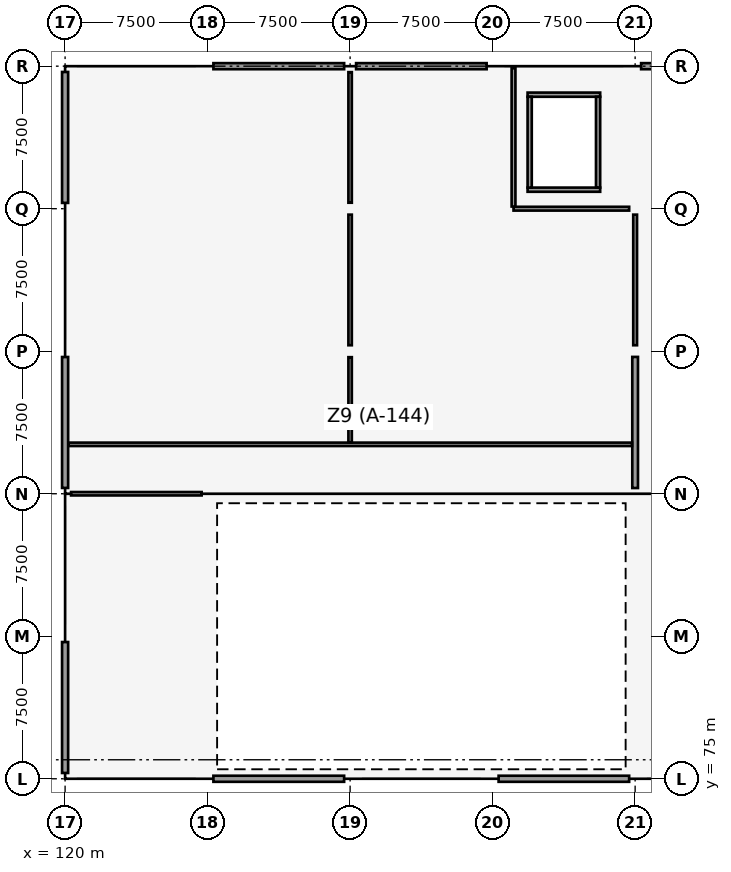
"""IFC4 building model, lengths in metres.
Left out: names, types, materials, properties, quantities, classifications, styles, units other than length and angle.
Written with IfcOpenShell. Run it as: python <this file> out.ifc"""

import sys

from ifc_helpers import new_model, si_unit, direction, frame, frame_2d, origin, origin_2d, place, context, subcontext, project, spatial, rectangle, extrude, element, fill, save


model = new_model("IFC4")
c1 = context("Model", 3, precision=1e-05, world=origin(), true_north=direction((0.0, 1.0)))
c2 = subcontext(c1, "Body", "Model", "MODEL_VIEW")
j1 = project(units=[si_unit("LENGTHUNIT", "METRE"), si_unit("PLANEANGLEUNIT", "RADIAN")], contexts=[c1])
p1 = place(None, origin())
s1 = spatial("IfcSite", under=j1, at=p1, CompositionType="ELEMENT")
p2 = place(p1, origin())
s2 = spatial("IfcBuilding", under=s1, at=p2, CompositionType="ELEMENT")
p3 = place(p2, frame((0.0, 0.0, 9.0)))
s3 = spatial("IfcBuildingStorey", under=s2, at=p3, CompositionType="ELEMENT", Elevation=9.0)
for number, where, z_axis, x_axis in (
    (1, (120.0, 75.0, 0.0), (0.0, 0.0, 1.0), (1.0, 0.0, 0.0)),
    (2, (120.0, 82.5, 0.0), (0.0, 0.0, 1.0), (1.0, 0.0, 0.0)),
    (3, (120.0, 90.0, 0.0), (0.0, 0.0, 1.0), (1.0, 0.0, 0.0)),
    (4, (120.0, 97.5, 0.0), (0.0, 0.0, 1.0), (1.0, 0.0, 0.0)),
    (5, (120.0, 105.0, 0.0), (0.0, 0.0, 1.0), (1.0, 0.0, 0.0)),
    (6, (120.0, 112.5, 0.0), (0.0, 0.0, 1.0), (1.0, 0.0, 0.0)),
    (7, (127.5, 75.0, 0.0), (0.0, 0.0, 1.0), (1.0, 0.0, 0.0)),
    (8, (127.5, 82.5, 0.0), (0.0, 0.0, 1.0), (1.0, 0.0, 0.0)),
    (9, (127.5, 90.0, 0.0), (0.0, 0.0, 1.0), (1.0, 0.0, 0.0)),
    (10, (127.5, 97.5, 0.0), (0.0, 0.0, 1.0), (1.0, 0.0, 0.0)),
    (11, (127.5, 105.0, 0.0), (0.0, 0.0, 1.0), (1.0, 0.0, 0.0)),
    (12, (127.5, 112.5, 0.0), (0.0, 0.0, 1.0), (1.0, 0.0, 0.0)),
    (13, (135.0, 75.0, 0.0), (0.0, 0.0, 1.0), (1.0, 0.0, 0.0)),
    (14, (135.0, 90.0, 0.0), (0.0, 0.0, 1.0), (1.0, 0.0, 0.0)),
    (15, (135.0, 97.5, 0.0), (0.0, 0.0, 1.0), (1.0, 0.0, 0.0)),
    (16, (135.0, 105.0, 0.0), (0.0, 0.0, 1.0), (1.0, 0.0, 0.0)),
    (17, (135.0, 112.5, 0.0), (0.0, 0.0, 1.0), (1.0, 0.0, 0.0)),
    (18, (142.5, 75.0, 0.0), (0.0, 0.0, 1.0), (1.0, 0.0, 0.0)),
    (19, (142.5, 90.0, 0.0), (0.0, 0.0, 1.0), (1.0, 0.0, 0.0)),
    (20, (142.5, 97.5, 0.0), (0.0, 0.0, 1.0), (1.0, 0.0, 0.0)),
    (21, (142.5, 105.0, 0.0), (0.0, 0.0, 1.0), (1.0, 0.0, 0.0)),
    (22, (142.5, 112.5, 0.0), (0.0, 0.0, 1.0), (1.0, 0.0, 0.0)),
    (23, (150.0, 75.0, 0.0), (0.0, 0.0, 1.0), (1.0, 0.0, 0.0)),
    (24, (150.0, 82.5, 0.0), (0.0, 0.0, 1.0), (1.0, 0.0, 0.0)),
    (25, (150.0, 90.0, 0.0), (0.0, 0.0, 1.0), (1.0, 0.0, 0.0)),
    (26, (150.0, 97.5, 0.0), (0.0, 0.0, 1.0), (1.0, 0.0, 0.0)),
    (27, (150.0, 105.0, 0.0), (0.0, 0.0, 1.0), (1.0, 0.0, 0.0)),
    (28, (150.0, 112.5, 0.0), (0.0, 0.0, 1.0), (1.0, 0.0, 0.0)),
):
    element("IfcColumn", number, at=place(p3, frame(where, z_axis=z_axis, x_axis=x_axis)), inside=s3, PredefinedType="COLUMN", context=c2, shape_type="SweptSolid", body=[
        extrude(rectangle(XDim=0.6, YDim=0.6, at=origin_2d()), origin(), (0.0, 0.0, 1.0), 4.2),
    ])
p4 = place(p3, frame((150.0, 90.3, 0.0), z_axis=(0.0, 0.0, 1.0), x_axis=(0.0, 1.0, 0.0)))
e29 = element("IfcWall", 29, at=p4, inside=s3, PredefinedType="SHEAR", context=c2, shape_type="SweptSolid", body=[
    extrude(rectangle(XDim=6.9, YDim=0.3, at=frame_2d((3.45, 0.0))), origin(), (0.0, 0.0, 1.0), 3.9),
])
p5 = place(p3, frame((127.805, 75.0, 0.0), z_axis=(0.0, 0.0, 1.0), x_axis=(1.0, 0.0, 0.0)))
e30 = element("IfcWall", 30, at=p5, inside=s3, PredefinedType="SOLIDWALL", context=c2, shape_type="SweptSolid", body=[
    extrude(rectangle(XDim=6.88, YDim=0.32, at=frame_2d((3.44, 0.0))), origin(), (0.0, 0.0, 1.0), 2.87),
])
p6 = place(p5, frame((2.37, 0.0, 0.6)))
e31 = element("IfcOpeningElement", 31, at=p6, cuts=e30, PredefinedType="OPENING", context=c2, shape_type="SweptSolid", body=[
    extrude(rectangle(XDim=2.15, YDim=1.45, at=frame_2d((1.075, 0.725))), frame((0.0, 0.17, 0.0), z_axis=(0.0, -1.0, 0.0), x_axis=(1.0, 0.0, 0.0)), (0.0, 0.0, 1.0), 0.34),
])
p7 = place(p3, frame((127.805, 112.5, 0.0), z_axis=(0.0, 0.0, 1.0), x_axis=(1.0, 0.0, 0.0)))
e32 = element("IfcWall", 32, at=p7, inside=s3, PredefinedType="SOLIDWALL", context=c2, shape_type="SweptSolid", body=[
    extrude(rectangle(XDim=6.88, YDim=0.32, at=frame_2d((3.44, 0.0))), origin(), (0.0, 0.0, 1.0), 3.12),
])
p8 = place(p7, frame((2.57, 0.0, 0.6)))
e33 = element("IfcOpeningElement", 33, at=p8, cuts=e32, PredefinedType="OPENING", context=c2, shape_type="SweptSolid", body=[
    extrude(rectangle(XDim=1.75, YDim=1.3, at=frame_2d((0.875, 0.65))), frame((0.0, 0.17, 0.0), z_axis=(0.0, -1.0, 0.0), x_axis=(1.0, 0.0, 0.0)), (0.0, 0.0, 1.0), 0.34),
])
p9 = place(p3, frame((135.315, 112.5, 0.0), z_axis=(0.0, 0.0, 1.0), x_axis=(1.0, 0.0, 0.0)))
e34 = element("IfcWall", 34, at=p9, inside=s3, PredefinedType="SOLIDWALL", context=c2, shape_type="SweptSolid", body=[
    extrude(rectangle(XDim=6.87, YDim=0.32, at=frame_2d((3.435, 0.0))), origin(), (0.0, 0.0, 1.0), 3.12),
])
p10 = place(p9, frame((2.46, 0.0, 0.6)))
e35 = element("IfcOpeningElement", 35, at=p10, cuts=e34, PredefinedType="OPENING", context=c2, shape_type="SweptSolid", body=[
    extrude(rectangle(XDim=1.95, YDim=1.3, at=frame_2d((0.975, 0.65))), frame((0.0, 0.17, 0.0), z_axis=(0.0, -1.0, 0.0), x_axis=(1.0, 0.0, 0.0)), (0.0, 0.0, 1.0), 0.34),
])
p11 = place(p3, frame((142.815, 75.0, 0.0), z_axis=(0.0, 0.0, 1.0), x_axis=(1.0, 0.0, 0.0)))
e36 = element("IfcWall", 36, at=p11, inside=s3, PredefinedType="SOLIDWALL", context=c2, shape_type="SweptSolid", body=[
    extrude(rectangle(XDim=6.87, YDim=0.32, at=frame_2d((3.435, 0.0))), origin(), (0.0, 0.0, 1.0), 2.87),
])
p12 = place(p11, frame((2.785, 0.0, 0.6)))
e37 = element("IfcOpeningElement", 37, at=p12, cuts=e36, PredefinedType="OPENING", context=c2, shape_type="SweptSolid", body=[
    extrude(rectangle(XDim=1.3, YDim=1.3, at=frame_2d((0.65, 0.65))), frame((0.0, 0.17, 0.0), z_axis=(0.0, -1.0, 0.0), x_axis=(1.0, 0.0, 0.0)), (0.0, 0.0, 1.0), 0.34),
])
p13 = place(p3, frame((150.315, 112.5, 0.0), z_axis=(0.0, 0.0, 1.0), x_axis=(1.0, 0.0, 0.0)))
e38 = element("IfcWall", 38, at=p13, inside=s3, PredefinedType="SOLIDWALL", context=c2, shape_type="SweptSolid", body=[
    extrude(rectangle(XDim=6.87, YDim=0.32, at=frame_2d((3.435, 0.0))), origin(), (0.0, 0.0, 1.0), 3.12),
])
p14 = place(p13, frame((2.285, 0.0, 0.6)))
e39 = element("IfcOpeningElement", 39, at=p14, cuts=e38, PredefinedType="OPENING", context=c2, shape_type="SweptSolid", body=[
    extrude(rectangle(XDim=2.3, YDim=1.3, at=frame_2d((1.15, 0.65))), frame((0.0, 0.17, 0.0), z_axis=(0.0, -1.0, 0.0), x_axis=(1.0, 0.0, 0.0)), (0.0, 0.0, 1.0), 0.34),
])
p15 = place(p3, frame((120.0, 75.305, 0.0), z_axis=(0.0, 0.0, 1.0), x_axis=(0.0, 1.0, 0.0)))
e40 = element("IfcWall", 40, at=p15, inside=s3, PredefinedType="SOLIDWALL", context=c2, shape_type="SweptSolid", body=[
    extrude(rectangle(XDim=6.89, YDim=0.32, at=frame_2d((3.445, 0.0))), origin(), (0.0, 0.0, 1.0), 2.97),
])
p16 = place(p15, frame((2.745, 0.0, 0.6)))
e41 = element("IfcOpeningElement", 41, at=p16, cuts=e40, PredefinedType="OPENING", context=c2, shape_type="SweptSolid", body=[
    extrude(rectangle(XDim=1.4, YDim=1.8, at=frame_2d((0.7, 0.9))), frame((0.0, 0.17, 0.0), z_axis=(0.0, -1.0, 0.0), x_axis=(1.0, 0.0, 0.0)), (0.0, 0.0, 1.0), 0.34),
])
p17 = place(p3, frame((120.0, 90.305, 0.0), z_axis=(0.0, 0.0, 1.0), x_axis=(0.0, 1.0, 0.0)))
e42 = element("IfcWall", 42, at=p17, inside=s3, PredefinedType="SOLIDWALL", context=c2, shape_type="SweptSolid", body=[
    extrude(rectangle(XDim=6.89, YDim=0.32, at=frame_2d((3.445, 0.0))), origin(), (0.0, 0.0, 1.0), 2.82),
])
p18 = place(p17, frame((2.595, 0.0, 0.6)))
e43 = element("IfcOpeningElement", 43, at=p18, cuts=e42, PredefinedType="OPENING", context=c2, shape_type="SweptSolid", body=[
    extrude(rectangle(XDim=1.7, YDim=1.8, at=frame_2d((0.85, 0.9))), frame((0.0, 0.17, 0.0), z_axis=(0.0, -1.0, 0.0), x_axis=(1.0, 0.0, 0.0)), (0.0, 0.0, 1.0), 0.34),
])
p19 = place(p3, frame((120.0, 105.305, 0.0), z_axis=(0.0, 0.0, 1.0), x_axis=(0.0, 1.0, 0.0)))
e44 = element("IfcWall", 44, at=p19, inside=s3, PredefinedType="SOLIDWALL", context=c2, shape_type="SweptSolid", body=[
    extrude(rectangle(XDim=6.89, YDim=0.32, at=frame_2d((3.445, 0.0))), origin(), (0.0, 0.0, 1.0), 2.97),
])
p20 = place(p19, frame((2.445, 0.0, 0.6)))
e45 = element("IfcOpeningElement", 45, at=p20, cuts=e44, PredefinedType="OPENING", context=c2, shape_type="SweptSolid", body=[
    extrude(rectangle(XDim=2.0, YDim=1.45, at=frame_2d((1.0, 0.725))), frame((0.0, 0.17, 0.0), z_axis=(0.0, -1.0, 0.0), x_axis=(1.0, 0.0, 0.0)), (0.0, 0.0, 1.0), 0.34),
])
p21 = place(p3, frame((144.34, 106.0, 0.0), z_axis=(0.0, 0.0, 1.0), x_axis=(1.0, 0.0, 0.0)))
e46 = element("IfcWall", 46, at=p21, inside=s3, PredefinedType="SOLIDWALL", context=c2, shape_type="SweptSolid", body=[
    extrude(rectangle(XDim=3.82, YDim=0.22, at=frame_2d((1.91, 0.0))), origin(), (0.0, 0.0, 1.0), 3.92),
])
p22 = place(p21, frame((0.81, 0.0, 0.0)))
e47 = element("IfcOpeningElement", 47, at=p22, cuts=e46, PredefinedType="OPENING", context=c2, shape_type="SweptSolid", body=[
    extrude(rectangle(XDim=2.2, YDim=2.35, at=frame_2d((1.1, 1.175))), frame((0.0, 0.12, 0.0), z_axis=(0.0, -1.0, 0.0), x_axis=(1.0, 0.0, 0.0)), (0.0, 0.0, 1.0), 0.24),
])
p23 = place(p3, frame((144.34, 111.0, 0.0), z_axis=(0.0, 0.0, 1.0), x_axis=(1.0, 0.0, 0.0)))
e48 = element("IfcWall", 48, at=p23, inside=s3, PredefinedType="SOLIDWALL", context=c2, shape_type="SweptSolid", body=[
    extrude(rectangle(XDim=3.82, YDim=0.22, at=frame_2d((1.91, 0.0))), origin(), (0.0, 0.0, 1.0), 3.92),
])
for number, where, z_axis, x_axis in (
    (49, (144.45, 106.11, 0.0), (0.0, 0.0, 1.0), (0.0, 1.0, 0.0)),
    (50, (148.05, 106.11, 0.0), (0.0, 0.0, 1.0), (0.0, 1.0, 0.0)),
):
    element("IfcWall", number, at=place(p3, frame(where, z_axis=z_axis, x_axis=x_axis)), inside=s3, PredefinedType="SOLIDWALL", context=c2, shape_type="SweptSolid", body=[
        extrude(rectangle(XDim=4.78, YDim=0.22, at=frame_2d((2.39, 0.0))), origin(), (0.0, 0.0, 1.0), 3.92),
    ])
p24 = place(p3, frame((143.6, 105.0, 0.0), z_axis=(0.0, 0.0, 1.0), x_axis=(1.0, 0.0, 0.0)))
e51 = element("IfcWall", 51, at=p24, inside=s3, PredefinedType="PARTITIONING", context=c2, shape_type="SweptSolid", body=[
    extrude(rectangle(XDim=6.086, YDim=0.2, at=frame_2d((3.043, 0.0))), origin(), (0.0, 0.0, 1.0), 2.82),
])
p25 = place(p3, frame((143.6, 105.114, 0.0), z_axis=(0.0, 0.0, 1.0), x_axis=(0.0, 1.0, 0.0)))
e52 = element("IfcWall", 52, at=p25, inside=s3, PredefinedType="PARTITIONING", context=c2, shape_type="SweptSolid", body=[
    extrude(rectangle(XDim=7.274, YDim=0.2, at=frame_2d((3.637, 0.0))), origin(), (0.0, 0.0, 1.0), 2.97),
])
p26 = place(p25, frame((2.786, 0.0, 0.0)))
e53 = element("IfcOpeningElement", 53, at=p26, cuts=e52, PredefinedType="OPENING", context=c2, shape_type="SweptSolid", body=[
    extrude(rectangle(XDim=1.2, YDim=2.15, at=frame_2d((0.6, 1.075))), frame((0.0, 0.11, 0.0), z_axis=(0.0, -1.0, 0.0), x_axis=(1.0, 0.0, 0.0)), (0.0, 0.0, 1.0), 0.22),
])
p27 = place(p3, frame((120.314, 90.0, 0.0), z_axis=(0.0, 0.0, 1.0), x_axis=(1.0, 0.0, 0.0)))
e54 = element("IfcWall", 54, at=p27, inside=s3, PredefinedType="PARTITIONING", context=c2, shape_type="SweptSolid", body=[
    extrude(rectangle(XDim=6.872, YDim=0.18, at=frame_2d((3.436, 0.0))), origin(), (0.0, 0.0, 1.0), 2.92),
])
p28 = place(p27, frame((2.786, 0.0, 0.0)))
e55 = element("IfcOpeningElement", 55, at=p28, cuts=e54, PredefinedType="OPENING", context=c2, shape_type="SweptSolid", body=[
    extrude(rectangle(XDim=1.3, YDim=2.15, at=frame_2d((0.65, 1.075))), frame((0.0, 0.1, 0.0), z_axis=(0.0, -1.0, 0.0), x_axis=(1.0, 0.0, 0.0)), (0.0, 0.0, 1.0), 0.2),
])
p29 = place(p3, frame((120.174, 92.6, 0.0), z_axis=(0.0, 0.0, 1.0), x_axis=(1.0, 0.0, 0.0)))
e56 = element("IfcWall", 56, at=p29, inside=s3, PredefinedType="PARTITIONING", context=c2, shape_type="SweptSolid", body=[
    extrude(rectangle(XDim=29.662, YDim=0.18, at=frame_2d((14.831, 0.0))), origin(), (0.0, 0.0, 1.0), 3.17),
])
p30 = place(p29, frame((6.676, 0.0, 0.0)))
e57 = element("IfcOpeningElement", 57, at=p30, cuts=e56, PredefinedType="OPENING", context=c2, shape_type="SweptSolid", body=[
    extrude(rectangle(XDim=1.3, YDim=2.15, at=frame_2d((0.65, 1.075))), frame((0.0, 0.1, 0.0), z_axis=(0.0, -1.0, 0.0), x_axis=(1.0, 0.0, 0.0)), (0.0, 0.0, 1.0), 0.2),
])
p31 = place(p29, frame((20.176, 0.0, 0.0)))
e58 = element("IfcOpeningElement", 58, at=p31, cuts=e56, PredefinedType="OPENING", context=c2, shape_type="SweptSolid", body=[
    extrude(rectangle(XDim=1.3, YDim=2.15, at=frame_2d((0.65, 1.075))), frame((0.0, 0.1, 0.0), z_axis=(0.0, -1.0, 0.0), x_axis=(1.0, 0.0, 0.0)), (0.0, 0.0, 1.0), 0.2),
])
p32 = place(p3, frame((135.0, 92.704, 0.0), z_axis=(0.0, 0.0, 1.0), x_axis=(0.0, 1.0, 0.0)))
e59 = element("IfcWall", 59, at=p32, inside=s3, PredefinedType="PARTITIONING", context=c2, shape_type="SweptSolid", body=[
    extrude(rectangle(XDim=4.482, YDim=0.18, at=frame_2d((2.241, 0.0))), origin(), (0.0, 0.0, 1.0), 3.02),
])
for number, where, z_axis, x_axis in (
    (60, (135.0, 97.814, 0.0), (0.0, 0.0, 1.0), (0.0, 1.0, 0.0)),
    (61, (135.0, 105.314, 0.0), (0.0, 0.0, 1.0), (0.0, 1.0, 0.0)),
):
    element("IfcWall", number, at=place(p3, frame(where, z_axis=z_axis, x_axis=x_axis)), inside=s3, PredefinedType="PARTITIONING", context=c2, shape_type="SweptSolid", body=[
        extrude(rectangle(XDim=6.872, YDim=0.18, at=frame_2d((3.436, 0.0))), origin(), (0.0, 0.0, 1.0), 2.92),
    ])
p33 = place(p3, frame((150.0, 97.814, 0.0), z_axis=(0.0, 0.0, 1.0), x_axis=(0.0, 1.0, 0.0)))
e62 = element("IfcWall", 62, at=p33, inside=s3, PredefinedType="PARTITIONING", context=c2, shape_type="SweptSolid", body=[
    extrude(rectangle(XDim=6.872, YDim=0.2, at=frame_2d((3.436, 0.0))), origin(), (0.0, 0.0, 1.0), 2.82),
])
p34 = place(p33, frame((2.636, 0.0, 0.0)))
e63 = element("IfcOpeningElement", 63, at=p34, cuts=e62, PredefinedType="OPENING", context=c2, shape_type="SweptSolid", body=[
    extrude(rectangle(XDim=1.6, YDim=2.16, at=frame_2d((0.8, 1.08))), frame((0.0, 0.11, 0.0), z_axis=(0.0, -1.0, 0.0), x_axis=(1.0, 0.0, 0.0)), (0.0, 0.0, 1.0), 0.22),
])
p35 = place(p6, origin())
e64 = element("IfcWindow", 64, at=p35, inside=s3, PartitioningType="SINGLE_PANEL", PredefinedType="WINDOW", context=c2, shape_type="SweptSolid", body=[
    extrude(rectangle(XDim=2.15, YDim=1.45, at=frame_2d((1.075, 0.725))), frame((0.0, 0.03, 0.0), z_axis=(0.0, -1.0, 0.0), x_axis=(1.0, 0.0, 0.0)), (0.0, 0.0, 1.0), 0.06),
])
fill(e31, e64)
p36 = place(p8, origin())
e65 = element("IfcWindow", 65, at=p36, inside=s3, PartitioningType="SINGLE_PANEL", PredefinedType="WINDOW", context=c2, shape_type="SweptSolid", body=[
    extrude(rectangle(XDim=1.75, YDim=1.3, at=frame_2d((0.875, 0.65))), frame((0.0, 0.03, 0.0), z_axis=(0.0, -1.0, 0.0), x_axis=(1.0, 0.0, 0.0)), (0.0, 0.0, 1.0), 0.06),
])
fill(e33, e65)
p37 = place(p10, origin())
e66 = element("IfcWindow", 66, at=p37, inside=s3, PartitioningType="SINGLE_PANEL", PredefinedType="WINDOW", context=c2, shape_type="SweptSolid", body=[
    extrude(rectangle(XDim=1.95, YDim=1.3, at=frame_2d((0.975, 0.65))), frame((0.0, 0.03, 0.0), z_axis=(0.0, -1.0, 0.0), x_axis=(1.0, 0.0, 0.0)), (0.0, 0.0, 1.0), 0.06),
])
fill(e35, e66)
p38 = place(p12, origin())
e67 = element("IfcWindow", 67, at=p38, inside=s3, PartitioningType="SINGLE_PANEL", PredefinedType="WINDOW", context=c2, shape_type="SweptSolid", body=[
    extrude(rectangle(XDim=1.3, YDim=1.3, at=frame_2d((0.65, 0.65))), frame((0.0, 0.03, 0.0), z_axis=(0.0, -1.0, 0.0), x_axis=(1.0, 0.0, 0.0)), (0.0, 0.0, 1.0), 0.06),
])
fill(e37, e67)
p39 = place(p16, origin())
e68 = element("IfcWindow", 68, at=p39, inside=s3, PartitioningType="SINGLE_PANEL", PredefinedType="WINDOW", context=c2, shape_type="SweptSolid", body=[
    extrude(rectangle(XDim=1.4, YDim=1.8, at=frame_2d((0.7, 0.9))), frame((0.0, 0.03, 0.0), z_axis=(0.0, -1.0, 0.0), x_axis=(1.0, 0.0, 0.0)), (0.0, 0.0, 1.0), 0.06),
])
fill(e41, e68)
p40 = place(p18, origin())
e69 = element("IfcWindow", 69, at=p40, inside=s3, PartitioningType="SINGLE_PANEL", PredefinedType="WINDOW", context=c2, shape_type="SweptSolid", body=[
    extrude(rectangle(XDim=1.7, YDim=1.8, at=frame_2d((0.85, 0.9))), frame((0.0, 0.03, 0.0), z_axis=(0.0, -1.0, 0.0), x_axis=(1.0, 0.0, 0.0)), (0.0, 0.0, 1.0), 0.06),
])
fill(e43, e69)
p41 = place(p20, origin())
e70 = element("IfcWindow", 70, at=p41, inside=s3, PartitioningType="SINGLE_PANEL", PredefinedType="WINDOW", context=c2, shape_type="SweptSolid", body=[
    extrude(rectangle(XDim=2.0, YDim=1.45, at=frame_2d((1.0, 0.725))), frame((0.0, 0.03, 0.0), z_axis=(0.0, -1.0, 0.0), x_axis=(1.0, 0.0, 0.0)), (0.0, 0.0, 1.0), 0.06),
])
fill(e45, e70)
p42 = place(p22, origin())
e71 = element("IfcDoor", 71, at=p42, inside=s3, OperationType="DOUBLE_DOOR_SLIDING", PredefinedType="DOOR", context=c2, shape_type="SweptSolid", body=[
    extrude(rectangle(XDim=2.2, YDim=2.35, at=frame_2d((1.1, 1.175))), frame((0.0, 0.025, 0.0), z_axis=(0.0, -1.0, 0.0), x_axis=(1.0, 0.0, 0.0)), (0.0, 0.0, 1.0), 0.05),
])
fill(e47, e71)
p43 = place(p26, origin())
e72 = element("IfcDoor", 72, at=p43, inside=s3, OperationType="SINGLE_SWING_RIGHT", PredefinedType="DOOR", context=c2, shape_type="SweptSolid", body=[
    extrude(rectangle(XDim=1.2, YDim=2.15, at=frame_2d((0.6, 1.075))), frame((0.0, 0.025, 0.0), z_axis=(0.0, -1.0, 0.0), x_axis=(1.0, 0.0, 0.0)), (0.0, 0.0, 1.0), 0.05),
])
fill(e53, e72)
p44 = place(p28, origin())
e73 = element("IfcDoor", 73, at=p44, inside=s3, OperationType="SINGLE_SWING_LEFT", PredefinedType="DOOR", context=c2, shape_type="SweptSolid", body=[
    extrude(rectangle(XDim=1.3, YDim=2.15, at=frame_2d((0.65, 1.075))), frame((0.0, 0.025, 0.0), z_axis=(0.0, -1.0, 0.0), x_axis=(1.0, 0.0, 0.0)), (0.0, 0.0, 1.0), 0.05),
])
fill(e55, e73)
p45 = place(p30, origin())
e74 = element("IfcDoor", 74, at=p45, inside=s3, OperationType="SINGLE_SWING_RIGHT", PredefinedType="DOOR", context=c2, shape_type="SweptSolid", body=[
    extrude(rectangle(XDim=1.3, YDim=2.15, at=frame_2d((0.65, 1.075))), frame((0.0, 0.025, 0.0), z_axis=(0.0, -1.0, 0.0), x_axis=(1.0, 0.0, 0.0)), (0.0, 0.0, 1.0), 0.05),
])
fill(e57, e74)
p46 = place(p31, origin())
e75 = element("IfcDoor", 75, at=p46, inside=s3, OperationType="SINGLE_SWING_LEFT", PredefinedType="DOOR", context=c2, shape_type="SweptSolid", body=[
    extrude(rectangle(XDim=1.3, YDim=2.15, at=frame_2d((0.65, 1.075))), frame((0.0, 0.025, 0.0), z_axis=(0.0, -1.0, 0.0), x_axis=(1.0, 0.0, 0.0)), (0.0, 0.0, 1.0), 0.05),
])
fill(e58, e75)
p47 = place(p34, origin())
e76 = element("IfcDoor", 76, at=p47, inside=s3, OperationType="SINGLE_SWING_RIGHT", PredefinedType="DOOR", context=c2, shape_type="SweptSolid", body=[
    extrude(rectangle(XDim=1.6, YDim=2.16, at=frame_2d((0.8, 1.08))), frame((0.0, 0.025, 0.0), z_axis=(0.0, -1.0, 0.0), x_axis=(1.0, 0.0, 0.0)), (0.0, 0.0, 1.0), 0.05),
])
fill(e63, e76)
save(model, sys.argv[1])
